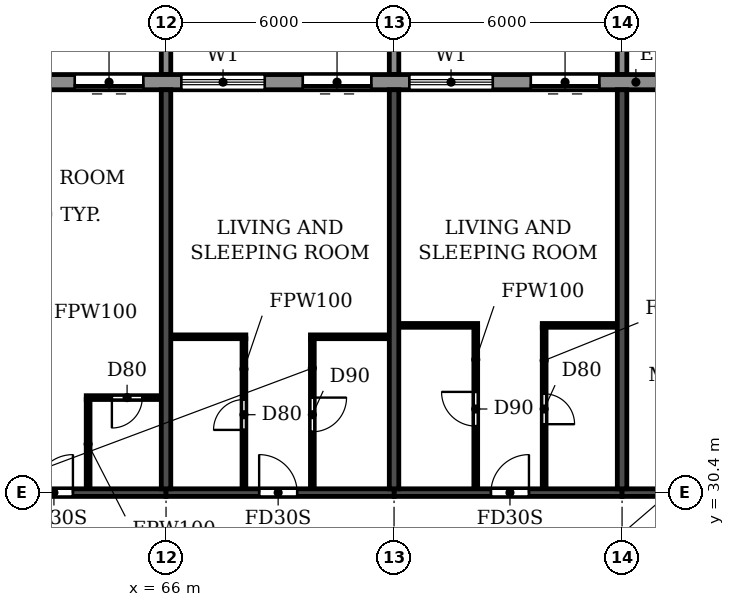
"""IFC4 building model, lengths in metres.
Left out: names, types, materials, properties, quantities, classifications, styles, units other than length and angle.
Written with IfcOpenShell. Run it as: python <this file> out.ifc"""

import sys

from ifc_helpers import new_model, si_unit, direction, frame, frame_2d, origin, place, context, subcontext, project, spatial, polyline, rectangle, outline, extrude, source, transform, mapped, element, fill, save


model = new_model("IFC4")
c1 = context("Model", 3, precision=1e-05, world=origin(), true_north=direction((0.0, 1.0)))
c2 = subcontext(c1, "Body", "Model", "MODEL_VIEW")
j1 = project(units=[si_unit("LENGTHUNIT", "METRE"), si_unit("PLANEANGLEUNIT", "RADIAN")], contexts=[c1])
p1 = place(None, origin())
s1 = spatial("IfcSite", under=j1, at=p1, CompositionType="ELEMENT")
p2 = place(p1, origin())
s2 = spatial("IfcBuilding", under=s1, at=p2, CompositionType="ELEMENT")
p3 = place(p2, frame((0.0, 0.0, 241.2)))
s3 = spatial("IfcBuildingStorey", under=s2, at=p3, CompositionType="ELEMENT", Elevation=241.2)
for number, where, z_axis, x_axis in (
    (1, (66.0, 30.5, 0.0), (0.0, 0.0, 1.0), (0.0, 1.0, 0.0)),
    (2, (72.0, 30.5, 0.0), (0.0, 0.0, 1.0), (0.0, 1.0, 0.0)),
    (3, (78.0, 30.5, 0.0), (0.0, 0.0, 1.0), (0.0, 1.0, 0.0)),
):
    element("IfcWall", number, at=place(p3, frame(where, z_axis=z_axis, x_axis=x_axis)), inside=s3, PredefinedType="SHEAR", context=c2, shape_type="SweptSolid", body=[
        extrude(rectangle(XDim=10.5, YDim=0.25, at=frame_2d((5.25, 0.0))), origin(), (0.0, 0.0, 1.0), 3.08),
    ])
p4 = place(p3, frame((60.0, 30.4, 0.0), z_axis=(0.0, 0.0, 1.0), x_axis=(1.0, 0.0, 0.0)))
e4 = element("IfcWall", 4, at=p4, inside=s3, PredefinedType="SHEAR", context=c2, shape_type="SweptSolid", body=[
    extrude(rectangle(XDim=6.0, YDim=0.2, at=frame_2d((3.0, 0.0))), origin(), (0.0, 0.0, 1.0), 2.48),
])
p5 = place(p4, frame((2.55, 0.0, 0.0)))
e5 = element("IfcOpeningElement", 5, at=p5, cuts=e4, PredefinedType="OPENING", context=c2, shape_type="SweptSolid", body=[
    extrude(rectangle(XDim=1.0, YDim=2.1, at=frame_2d((0.5, 1.05))), frame((0.0, 0.11, 0.0), z_axis=(0.0, -1.0, 0.0), x_axis=(1.0, 0.0, 0.0)), (0.0, 0.0, 1.0), 0.22),
])
p6 = place(p3, frame((66.0, 30.4, 0.0), z_axis=(0.0, 0.0, 1.0), x_axis=(1.0, 0.0, 0.0)))
e6 = element("IfcWall", 6, at=p6, inside=s3, PredefinedType="SHEAR", context=c2, shape_type="SweptSolid", body=[
    extrude(rectangle(XDim=6.0, YDim=0.2, at=frame_2d((3.0, 0.0))), origin(), (0.0, 0.0, 1.0), 2.48),
])
p7 = place(p6, frame((2.45, 0.0, 0.0)))
e7 = element("IfcOpeningElement", 7, at=p7, cuts=e6, PredefinedType="OPENING", context=c2, shape_type="SweptSolid", body=[
    extrude(rectangle(XDim=1.0, YDim=2.1, at=frame_2d((0.5, 1.05))), frame((0.0, 0.11, 0.0), z_axis=(0.0, -1.0, 0.0), x_axis=(1.0, 0.0, 0.0)), (0.0, 0.0, 1.0), 0.22),
])
p8 = place(p3, frame((72.0, 30.4, 0.0), z_axis=(0.0, 0.0, 1.0), x_axis=(1.0, 0.0, 0.0)))
e8 = element("IfcWall", 8, at=p8, inside=s3, PredefinedType="SHEAR", context=c2, shape_type="SweptSolid", body=[
    extrude(rectangle(XDim=6.0, YDim=0.2, at=frame_2d((3.0, 0.0))), origin(), (0.0, 0.0, 1.0), 2.48),
])
p9 = place(p8, frame((2.55, 0.0, 0.0)))
e9 = element("IfcOpeningElement", 9, at=p9, cuts=e8, PredefinedType="OPENING", context=c2, shape_type="SweptSolid", body=[
    extrude(rectangle(XDim=1.0, YDim=2.1, at=frame_2d((0.5, 1.05))), frame((0.0, 0.11, 0.0), z_axis=(0.0, -1.0, 0.0), x_axis=(1.0, 0.0, 0.0)), (0.0, 0.0, 1.0), 0.22),
])
p10 = place(p3, frame((78.0, 30.4, 0.0), z_axis=(0.0, 0.0, 1.0), x_axis=(1.0, 0.0, 0.0)))
e10 = element("IfcWall", 10, at=p10, inside=s3, PredefinedType="SHEAR", context=c2, shape_type="SweptSolid", body=[
    extrude(rectangle(XDim=5.8, YDim=0.2, at=frame_2d((2.9, 0.0))), origin(), (0.0, 0.0, 1.0), 2.48),
])
p11 = place(p10, frame((2.5, 0.0, 0.0)))
e11 = element("IfcOpeningElement", 11, at=p11, cuts=e10, PredefinedType="OPENING", context=c2, shape_type="SweptSolid", body=[
    extrude(rectangle(XDim=1.0, YDim=2.1, at=frame_2d((0.5, 1.05))), frame((0.0, 0.11, 0.0), z_axis=(0.0, -1.0, 0.0), x_axis=(1.0, 0.0, 0.0)), (0.0, 0.0, 1.0), 0.22),
])
p12 = place(p3, frame((79.317, 41.2, 0.0), z_axis=(0.0, 0.0, 1.0), x_axis=(-1.0, 0.0, 0.0)))
e12 = element("IfcWall", 12, at=p12, inside=s3, PredefinedType="STANDARD", context=c2, shape_type="SweptSolid", body=[
    extrude(rectangle(XDim=56.634, YDim=0.4, at=frame_2d((28.317, 0.0))), origin(), (0.0, 0.0, 1.0), 3.08),
])
p13 = place(p12, frame((52.917, 0.0, 0.0)))
e13 = element("IfcOpeningElement", 13, at=p13, cuts=e12, PredefinedType="OPENING", context=c2, shape_type="SweptSolid", body=[
    extrude(rectangle(XDim=1.8, YDim=2.4, at=frame_2d((0.9, 1.2))), frame((0.0, 0.21, 0.0), z_axis=(0.0, -1.0, 0.0), x_axis=(1.0, 0.0, 0.0)), (0.0, 0.0, 1.0), 0.42),
])
p14 = place(p12, frame((49.717, 0.0, 0.9)))
e14 = element("IfcOpeningElement", 14, at=p14, cuts=e12, PredefinedType="OPENING", context=c2, shape_type="SweptSolid", body=[
    extrude(rectangle(XDim=2.2, YDim=1.5, at=frame_2d((1.1, 0.75))), frame((0.0, 0.21, 0.0), z_axis=(0.0, -1.0, 0.0), x_axis=(1.0, 0.0, 0.0)), (0.0, 0.0, 1.0), 0.42),
])
p15 = place(p12, frame((46.717, 0.0, 0.9)))
e15 = element("IfcOpeningElement", 15, at=p15, cuts=e12, PredefinedType="OPENING", context=c2, shape_type="SweptSolid", body=[
    extrude(rectangle(XDim=2.2, YDim=1.5, at=frame_2d((1.1, 0.75))), frame((0.0, 0.21, 0.0), z_axis=(0.0, -1.0, 0.0), x_axis=(1.0, 0.0, 0.0)), (0.0, 0.0, 1.0), 0.42),
])
p16 = place(p12, frame((43.717, 0.0, 0.9)))
e16 = element("IfcOpeningElement", 16, at=p16, cuts=e12, PredefinedType="OPENING", context=c2, shape_type="SweptSolid", body=[
    extrude(rectangle(XDim=2.2, YDim=1.5, at=frame_2d((1.1, 0.75))), frame((0.0, 0.21, 0.0), z_axis=(0.0, -1.0, 0.0), x_axis=(1.0, 0.0, 0.0)), (0.0, 0.0, 1.0), 0.42),
])
p17 = place(p12, frame((40.917, 0.0, 0.0)))
e17 = element("IfcOpeningElement", 17, at=p17, cuts=e12, PredefinedType="OPENING", context=c2, shape_type="SweptSolid", body=[
    extrude(rectangle(XDim=1.8, YDim=2.4, at=frame_2d((0.9, 1.2))), frame((0.0, 0.21, 0.0), z_axis=(0.0, -1.0, 0.0), x_axis=(1.0, 0.0, 0.0)), (0.0, 0.0, 1.0), 0.42),
])
p18 = place(p12, frame((37.717, 0.0, 0.9)))
e18 = element("IfcOpeningElement", 18, at=p18, cuts=e12, PredefinedType="OPENING", context=c2, shape_type="SweptSolid", body=[
    extrude(rectangle(XDim=2.2, YDim=1.5, at=frame_2d((1.1, 0.75))), frame((0.0, 0.21, 0.0), z_axis=(0.0, -1.0, 0.0), x_axis=(1.0, 0.0, 0.0)), (0.0, 0.0, 1.0), 0.42),
])
p19 = place(p12, frame((34.717, 0.0, 0.9)))
e19 = element("IfcOpeningElement", 19, at=p19, cuts=e12, PredefinedType="OPENING", context=c2, shape_type="SweptSolid", body=[
    extrude(rectangle(XDim=2.2, YDim=1.5, at=frame_2d((1.1, 0.75))), frame((0.0, 0.21, 0.0), z_axis=(0.0, -1.0, 0.0), x_axis=(1.0, 0.0, 0.0)), (0.0, 0.0, 1.0), 0.42),
])
p20 = place(p12, frame((31.717, 0.0, 0.9)))
e20 = element("IfcOpeningElement", 20, at=p20, cuts=e12, PredefinedType="OPENING", context=c2, shape_type="SweptSolid", body=[
    extrude(rectangle(XDim=2.2, YDim=1.5, at=frame_2d((1.1, 0.75))), frame((0.0, 0.21, 0.0), z_axis=(0.0, -1.0, 0.0), x_axis=(1.0, 0.0, 0.0)), (0.0, 0.0, 1.0), 0.42),
])
p21 = place(p12, frame((28.717, 0.0, 0.9)))
e21 = element("IfcOpeningElement", 21, at=p21, cuts=e12, PredefinedType="OPENING", context=c2, shape_type="SweptSolid", body=[
    extrude(rectangle(XDim=2.2, YDim=1.5, at=frame_2d((1.1, 0.75))), frame((0.0, 0.21, 0.0), z_axis=(0.0, -1.0, 0.0), x_axis=(1.0, 0.0, 0.0)), (0.0, 0.0, 1.0), 0.42),
])
p22 = place(p12, frame((25.917, 0.0, 0.0)))
e22 = element("IfcOpeningElement", 22, at=p22, cuts=e12, PredefinedType="OPENING", context=c2, shape_type="SweptSolid", body=[
    extrude(rectangle(XDim=1.8, YDim=2.4, at=frame_2d((0.9, 1.2))), frame((0.0, 0.21, 0.0), z_axis=(0.0, -1.0, 0.0), x_axis=(1.0, 0.0, 0.0)), (0.0, 0.0, 1.0), 0.42),
])
p23 = place(p12, frame((22.717, 0.0, 0.9)))
e23 = element("IfcOpeningElement", 23, at=p23, cuts=e12, PredefinedType="OPENING", context=c2, shape_type="SweptSolid", body=[
    extrude(rectangle(XDim=2.2, YDim=1.5, at=frame_2d((1.1, 0.75))), frame((0.0, 0.21, 0.0), z_axis=(0.0, -1.0, 0.0), x_axis=(1.0, 0.0, 0.0)), (0.0, 0.0, 1.0), 0.42),
])
p24 = place(p12, frame((19.717, 0.0, 0.9)))
e24 = element("IfcOpeningElement", 24, at=p24, cuts=e12, PredefinedType="OPENING", context=c2, shape_type="SweptSolid", body=[
    extrude(rectangle(XDim=2.2, YDim=1.5, at=frame_2d((1.1, 0.75))), frame((0.0, 0.21, 0.0), z_axis=(0.0, -1.0, 0.0), x_axis=(1.0, 0.0, 0.0)), (0.0, 0.0, 1.0), 0.42),
])
p25 = place(p12, frame((16.717, 0.0, 0.9)))
e25 = element("IfcOpeningElement", 25, at=p25, cuts=e12, PredefinedType="OPENING", context=c2, shape_type="SweptSolid", body=[
    extrude(rectangle(XDim=2.2, YDim=1.5, at=frame_2d((1.1, 0.75))), frame((0.0, 0.21, 0.0), z_axis=(0.0, -1.0, 0.0), x_axis=(1.0, 0.0, 0.0)), (0.0, 0.0, 1.0), 0.42),
])
p26 = place(p12, frame((13.917, 0.0, 0.0)))
e26 = element("IfcOpeningElement", 26, at=p26, cuts=e12, PredefinedType="OPENING", context=c2, shape_type="SweptSolid", body=[
    extrude(rectangle(XDim=1.8, YDim=2.4, at=frame_2d((0.9, 1.2))), frame((0.0, 0.21, 0.0), z_axis=(0.0, -1.0, 0.0), x_axis=(1.0, 0.0, 0.0)), (0.0, 0.0, 1.0), 0.42),
])
p27 = place(p12, frame((10.717, 0.0, 0.9)))
e27 = element("IfcOpeningElement", 27, at=p27, cuts=e12, PredefinedType="OPENING", context=c2, shape_type="SweptSolid", body=[
    extrude(rectangle(XDim=2.2, YDim=1.5, at=frame_2d((1.1, 0.75))), frame((0.0, 0.21, 0.0), z_axis=(0.0, -1.0, 0.0), x_axis=(1.0, 0.0, 0.0)), (0.0, 0.0, 1.0), 0.42),
])
p28 = place(p12, frame((7.917, 0.0, 0.0)))
e28 = element("IfcOpeningElement", 28, at=p28, cuts=e12, PredefinedType="OPENING", context=c2, shape_type="SweptSolid", body=[
    extrude(rectangle(XDim=1.8, YDim=2.4, at=frame_2d((0.9, 1.2))), frame((0.0, 0.21, 0.0), z_axis=(0.0, -1.0, 0.0), x_axis=(1.0, 0.0, 0.0)), (0.0, 0.0, 1.0), 0.42),
])
p29 = place(p12, frame((4.717, 0.0, 0.9)))
e29 = element("IfcOpeningElement", 29, at=p29, cuts=e12, PredefinedType="OPENING", context=c2, shape_type="SweptSolid", body=[
    extrude(rectangle(XDim=2.2, YDim=1.5, at=frame_2d((1.1, 0.75))), frame((0.0, 0.21, 0.0), z_axis=(0.0, -1.0, 0.0), x_axis=(1.0, 0.0, 0.0)), (0.0, 0.0, 1.0), 0.42),
])
p30 = place(p12, frame((1.917, 0.0, 0.0)))
e30 = element("IfcOpeningElement", 30, at=p30, cuts=e12, PredefinedType="OPENING", context=c2, shape_type="SweptSolid", body=[
    extrude(rectangle(XDim=1.8, YDim=2.4, at=frame_2d((0.9, 1.2))), frame((0.0, 0.21, 0.0), z_axis=(0.0, -1.0, 0.0), x_axis=(1.0, 0.0, 0.0)), (0.0, 0.0, 1.0), 0.42),
])
m1 = source(origin(), c2, "Body", "SweptSolid", [
    extrude(outline(polyline([(0.0, 0.0), (0.25, 0.0), (0.25, 3.1), (0.0, 3.1), (0.0, 0.0)])), origin(), (0.0, 0.0, 1.0), 3.1),
])
for number, where in (
    (31, (65.875, 41.4, 0.0)),
    (32, (71.875, 41.4, 0.0)),
    (33, (77.875, 41.4, 0.0)),
):
    element("IfcWall", number, at=place(p3, frame(where)), inside=s3, PredefinedType="STANDARD", context=c2, shape_type="MappedRepresentation", body=[
        mapped(m1, transform((0.0, 0.0, 0.0))),
    ])
p31 = place(p3, frame((63.9, 32.9, 0.0), z_axis=(0.0, 0.0, 1.0), x_axis=(1.0, 0.0, 0.0)))
e34 = element("IfcWall", 34, at=p31, inside=s3, PredefinedType="PARTITIONING", context=c2, shape_type="SweptSolid", body=[
    extrude(rectangle(XDim=1.965, YDim=0.1, at=frame_2d((0.982, 0.0))), origin(), (0.0, 0.0, 1.0), 3.08),
])
p32 = place(p31, frame((0.675, 0.0, 0.0)))
e35 = element("IfcOpeningElement", 35, at=p32, cuts=e34, PredefinedType="OPENING", context=c2, shape_type="SweptSolid", body=[
    extrude(rectangle(XDim=0.8, YDim=2.1, at=frame_2d((0.4, 1.05))), frame((0.0, 0.06, 0.0), z_axis=(0.0, -1.0, 0.0), x_axis=(1.0, 0.0, 0.0)), (0.0, 0.0, 1.0), 0.12),
])
p33 = place(p3, frame((66.135, 34.5, 0.0), z_axis=(0.0, 0.0, 1.0), x_axis=(1.0, 0.0, 0.0)))
e36 = element("IfcWall", 36, at=p33, inside=s3, PredefinedType="PARTITIONING", context=c2, shape_type="SweptSolid", body=[
    extrude(rectangle(XDim=1.965, YDim=0.1, at=frame_2d((0.982, 0.0))), origin(), (0.0, 0.0, 1.0), 3.08),
])
for number, where, z_axis, x_axis in (
    (37, (69.8, 34.5, 0.0), (0.0, 0.0, 1.0), (1.0, 0.0, 0.0)),
    (38, (72.135, 34.8, 0.0), (0.0, 0.0, 1.0), (1.0, 0.0, 0.0)),
):
    element("IfcWall", number, at=place(p3, frame(where, z_axis=z_axis, x_axis=x_axis)), inside=s3, PredefinedType="PARTITIONING", context=c2, shape_type="SweptSolid", body=[
        extrude(rectangle(XDim=2.065, YDim=0.1, at=frame_2d((1.032, 0.0))), origin(), (0.0, 0.0, 1.0), 3.08),
    ])
p34 = place(p3, frame((75.9, 34.8, 0.0), z_axis=(0.0, 0.0, 1.0), x_axis=(1.0, 0.0, 0.0)))
e39 = element("IfcWall", 39, at=p34, inside=s3, PredefinedType="PARTITIONING", context=c2, shape_type="SweptSolid", body=[
    extrude(rectangle(XDim=1.965, YDim=0.1, at=frame_2d((0.982, 0.0))), origin(), (0.0, 0.0, 1.0), 3.08),
])
p35 = place(p3, frame((63.95, 30.51, 0.0), z_axis=(0.0, 0.0, 1.0), x_axis=(0.0, 1.0, 0.0)))
e40 = element("IfcWall", 40, at=p35, inside=s3, PredefinedType="PARTITIONING", context=c2, shape_type="SweptSolid", body=[
    extrude(rectangle(XDim=2.34, YDim=0.1, at=frame_2d((1.17, 0.0))), origin(), (0.0, 0.0, 1.0), 3.08),
])
p36 = place(p3, frame((68.05, 30.51, 0.0), z_axis=(0.0, 0.0, 1.0), x_axis=(0.0, 1.0, 0.0)))
e41 = element("IfcWall", 41, at=p36, inside=s3, PredefinedType="PARTITIONING", context=c2, shape_type="SweptSolid", body=[
    extrude(rectangle(XDim=3.94, YDim=0.1, at=frame_2d((1.97, 0.0))), origin(), (0.0, 0.0, 1.0), 3.08),
])
p37 = place(p36, frame((1.54, 0.0, 0.0)))
e42 = element("IfcOpeningElement", 42, at=p37, cuts=e41, PredefinedType="OPENING", context=c2, shape_type="SweptSolid", body=[
    extrude(rectangle(XDim=0.8, YDim=2.1, at=frame_2d((0.4, 1.05))), frame((0.0, 0.06, 0.0), z_axis=(0.0, -1.0, 0.0), x_axis=(1.0, 0.0, 0.0)), (0.0, 0.0, 1.0), 0.12),
])
p38 = place(p3, frame((69.85, 30.51, 0.0), z_axis=(0.0, 0.0, 1.0), x_axis=(0.0, 1.0, 0.0)))
e43 = element("IfcWall", 43, at=p38, inside=s3, PredefinedType="PARTITIONING", context=c2, shape_type="SweptSolid", body=[
    extrude(rectangle(XDim=3.94, YDim=0.1, at=frame_2d((1.97, 0.0))), origin(), (0.0, 0.0, 1.0), 3.08),
])
p39 = place(p38, frame((1.49, 0.0, 0.0)))
e44 = element("IfcOpeningElement", 44, at=p39, cuts=e43, PredefinedType="OPENING", context=c2, shape_type="SweptSolid", body=[
    extrude(rectangle(XDim=0.9, YDim=2.1, at=frame_2d((0.45, 1.05))), frame((0.0, 0.06, 0.0), z_axis=(0.0, -1.0, 0.0), x_axis=(1.0, 0.0, 0.0)), (0.0, 0.0, 1.0), 0.12),
])
p40 = place(p3, frame((74.15, 30.51, 0.0), z_axis=(0.0, 0.0, 1.0), x_axis=(0.0, 1.0, 0.0)))
e45 = element("IfcWall", 45, at=p40, inside=s3, PredefinedType="PARTITIONING", context=c2, shape_type="SweptSolid", body=[
    extrude(rectangle(XDim=4.24, YDim=0.1, at=frame_2d((2.12, 0.0))), origin(), (0.0, 0.0, 1.0), 3.08),
])
p41 = place(p40, frame((1.64, 0.0, 0.0)))
e46 = element("IfcOpeningElement", 46, at=p41, cuts=e45, PredefinedType="OPENING", context=c2, shape_type="SweptSolid", body=[
    extrude(rectangle(XDim=0.9, YDim=2.1, at=frame_2d((0.45, 1.05))), frame((0.0, 0.06, 0.0), z_axis=(0.0, -1.0, 0.0), x_axis=(1.0, 0.0, 0.0)), (0.0, 0.0, 1.0), 0.12),
])
p42 = place(p3, frame((75.95, 30.51, 0.0), z_axis=(0.0, 0.0, 1.0), x_axis=(0.0, 1.0, 0.0)))
e47 = element("IfcWall", 47, at=p42, inside=s3, PredefinedType="PARTITIONING", context=c2, shape_type="SweptSolid", body=[
    extrude(rectangle(XDim=4.24, YDim=0.1, at=frame_2d((2.12, 0.0))), origin(), (0.0, 0.0, 1.0), 3.08),
])
p43 = place(p42, frame((1.69, 0.0, 0.0)))
e48 = element("IfcOpeningElement", 48, at=p43, cuts=e47, PredefinedType="OPENING", context=c2, shape_type="SweptSolid", body=[
    extrude(rectangle(XDim=0.8, YDim=2.1, at=frame_2d((0.4, 1.05))), frame((0.0, 0.06, 0.0), z_axis=(0.0, -1.0, 0.0), x_axis=(1.0, 0.0, 0.0)), (0.0, 0.0, 1.0), 0.12),
])
p44 = place(p26, origin())
e49 = element("IfcDoor", 49, at=p44, inside=s3, OperationType="DOUBLE_DOOR_SLIDING", PredefinedType="DOOR", context=c2, shape_type="SweptSolid", body=[
    extrude(rectangle(XDim=1.8, YDim=2.4, at=frame_2d((0.9, 1.2))), frame((0.0, 0.025, 0.0), z_axis=(0.0, -1.0, 0.0), x_axis=(1.0, 0.0, 0.0)), (0.0, 0.0, 1.0), 0.05),
])
fill(e26, e49)
p45 = place(p27, origin())
e50 = element("IfcWindow", 50, at=p45, inside=s3, PartitioningType="DOUBLE_PANEL_HORIZONTAL", PredefinedType="WINDOW", context=c2, shape_type="SweptSolid", body=[
    extrude(rectangle(XDim=2.2, YDim=1.5, at=frame_2d((1.1, 0.75))), frame((0.0, 0.03, 0.0), z_axis=(0.0, -1.0, 0.0), x_axis=(1.0, 0.0, 0.0)), (0.0, 0.0, 1.0), 0.06),
])
fill(e27, e50)
p46 = place(p28, origin())
e51 = element("IfcDoor", 51, at=p46, inside=s3, OperationType="DOUBLE_DOOR_SLIDING", PredefinedType="DOOR", context=c2, shape_type="SweptSolid", body=[
    extrude(rectangle(XDim=1.8, YDim=2.4, at=frame_2d((0.9, 1.2))), frame((0.0, 0.025, 0.0), z_axis=(0.0, -1.0, 0.0), x_axis=(1.0, 0.0, 0.0)), (0.0, 0.0, 1.0), 0.05),
])
fill(e28, e51)
p47 = place(p29, origin())
e52 = element("IfcWindow", 52, at=p47, inside=s3, PartitioningType="DOUBLE_PANEL_HORIZONTAL", PredefinedType="WINDOW", context=c2, shape_type="SweptSolid", body=[
    extrude(rectangle(XDim=2.2, YDim=1.5, at=frame_2d((1.1, 0.75))), frame((0.0, 0.03, 0.0), z_axis=(0.0, -1.0, 0.0), x_axis=(1.0, 0.0, 0.0)), (0.0, 0.0, 1.0), 0.06),
])
fill(e29, e52)
p48 = place(p30, origin())
e53 = element("IfcDoor", 53, at=p48, inside=s3, OperationType="DOUBLE_DOOR_SLIDING", PredefinedType="DOOR", context=c2, shape_type="SweptSolid", body=[
    extrude(rectangle(XDim=1.8, YDim=2.4, at=frame_2d((0.9, 1.2))), frame((0.0, 0.025, 0.0), z_axis=(0.0, -1.0, 0.0), x_axis=(1.0, 0.0, 0.0)), (0.0, 0.0, 1.0), 0.05),
])
fill(e30, e53)
p49 = place(p5, origin())
e54 = element("IfcDoor", 54, at=p49, inside=s3, OperationType="SINGLE_SWING_RIGHT", PredefinedType="DOOR", context=c2, shape_type="SweptSolid", body=[
    extrude(rectangle(XDim=1.0, YDim=2.1, at=frame_2d((0.5, 1.05))), frame((0.0, 0.025, 0.0), z_axis=(0.0, -1.0, 0.0), x_axis=(1.0, 0.0, 0.0)), (0.0, 0.0, 1.0), 0.05),
])
fill(e5, e54)
p50 = place(p32, frame((0.8, 0.0, 0.0), z_axis=(0.0, 0.0, 1.0), x_axis=(-1.0, 0.0, 0.0)))
e55 = element("IfcDoor", 55, at=p50, inside=s3, OperationType="SINGLE_SWING_RIGHT", PredefinedType="DOOR", context=c2, shape_type="SweptSolid", body=[
    extrude(rectangle(XDim=0.8, YDim=2.1, at=frame_2d((0.4, 1.05))), frame((0.0, 0.025, 0.0), z_axis=(0.0, -1.0, 0.0), x_axis=(1.0, 0.0, 0.0)), (0.0, 0.0, 1.0), 0.05),
])
fill(e35, e55)
p51 = place(p37, origin())
e56 = element("IfcDoor", 56, at=p51, inside=s3, OperationType="SINGLE_SWING_LEFT", PredefinedType="DOOR", context=c2, shape_type="SweptSolid", body=[
    extrude(rectangle(XDim=0.8, YDim=2.1, at=frame_2d((0.4, 1.05))), frame((0.0, 0.025, 0.0), z_axis=(0.0, -1.0, 0.0), x_axis=(1.0, 0.0, 0.0)), (0.0, 0.0, 1.0), 0.05),
])
fill(e42, e56)
p52 = place(p7, origin())
e57 = element("IfcDoor", 57, at=p52, inside=s3, OperationType="SINGLE_SWING_LEFT", PredefinedType="DOOR", context=c2, shape_type="SweptSolid", body=[
    extrude(rectangle(XDim=1.0, YDim=2.1, at=frame_2d((0.5, 1.05))), frame((0.0, 0.025, 0.0), z_axis=(0.0, -1.0, 0.0), x_axis=(1.0, 0.0, 0.0)), (0.0, 0.0, 1.0), 0.05),
])
fill(e7, e57)
p53 = place(p39, frame((0.9, 0.0, 0.0), z_axis=(0.0, 0.0, 1.0), x_axis=(-1.0, 0.0, 0.0)))
e58 = element("IfcDoor", 58, at=p53, inside=s3, OperationType="SINGLE_SWING_LEFT", PredefinedType="DOOR", context=c2, shape_type="SweptSolid", body=[
    extrude(rectangle(XDim=0.9, YDim=2.1, at=frame_2d((0.45, 1.05))), frame((0.0, 0.025, 0.0), z_axis=(0.0, -1.0, 0.0), x_axis=(1.0, 0.0, 0.0)), (0.0, 0.0, 1.0), 0.05),
])
fill(e44, e58)
p54 = place(p41, origin())
e59 = element("IfcDoor", 59, at=p54, inside=s3, OperationType="SINGLE_SWING_RIGHT", PredefinedType="DOOR", context=c2, shape_type="SweptSolid", body=[
    extrude(rectangle(XDim=0.9, YDim=2.1, at=frame_2d((0.45, 1.05))), frame((0.0, 0.025, 0.0), z_axis=(0.0, -1.0, 0.0), x_axis=(1.0, 0.0, 0.0)), (0.0, 0.0, 1.0), 0.05),
])
fill(e46, e59)
p55 = place(p9, origin())
e60 = element("IfcDoor", 60, at=p55, inside=s3, OperationType="SINGLE_SWING_RIGHT", PredefinedType="DOOR", context=c2, shape_type="SweptSolid", body=[
    extrude(rectangle(XDim=1.0, YDim=2.1, at=frame_2d((0.5, 1.05))), frame((0.0, 0.025, 0.0), z_axis=(0.0, -1.0, 0.0), x_axis=(1.0, 0.0, 0.0)), (0.0, 0.0, 1.0), 0.05),
])
fill(e9, e60)
p56 = place(p43, frame((0.8, 0.0, 0.0), z_axis=(0.0, 0.0, 1.0), x_axis=(-1.0, 0.0, 0.0)))
e61 = element("IfcDoor", 61, at=p56, inside=s3, OperationType="SINGLE_SWING_RIGHT", PredefinedType="DOOR", context=c2, shape_type="SweptSolid", body=[
    extrude(rectangle(XDim=0.8, YDim=2.1, at=frame_2d((0.4, 1.05))), frame((0.0, 0.025, 0.0), z_axis=(0.0, -1.0, 0.0), x_axis=(1.0, 0.0, 0.0)), (0.0, 0.0, 1.0), 0.05),
])
fill(e48, e61)
save(model, sys.argv[1])
